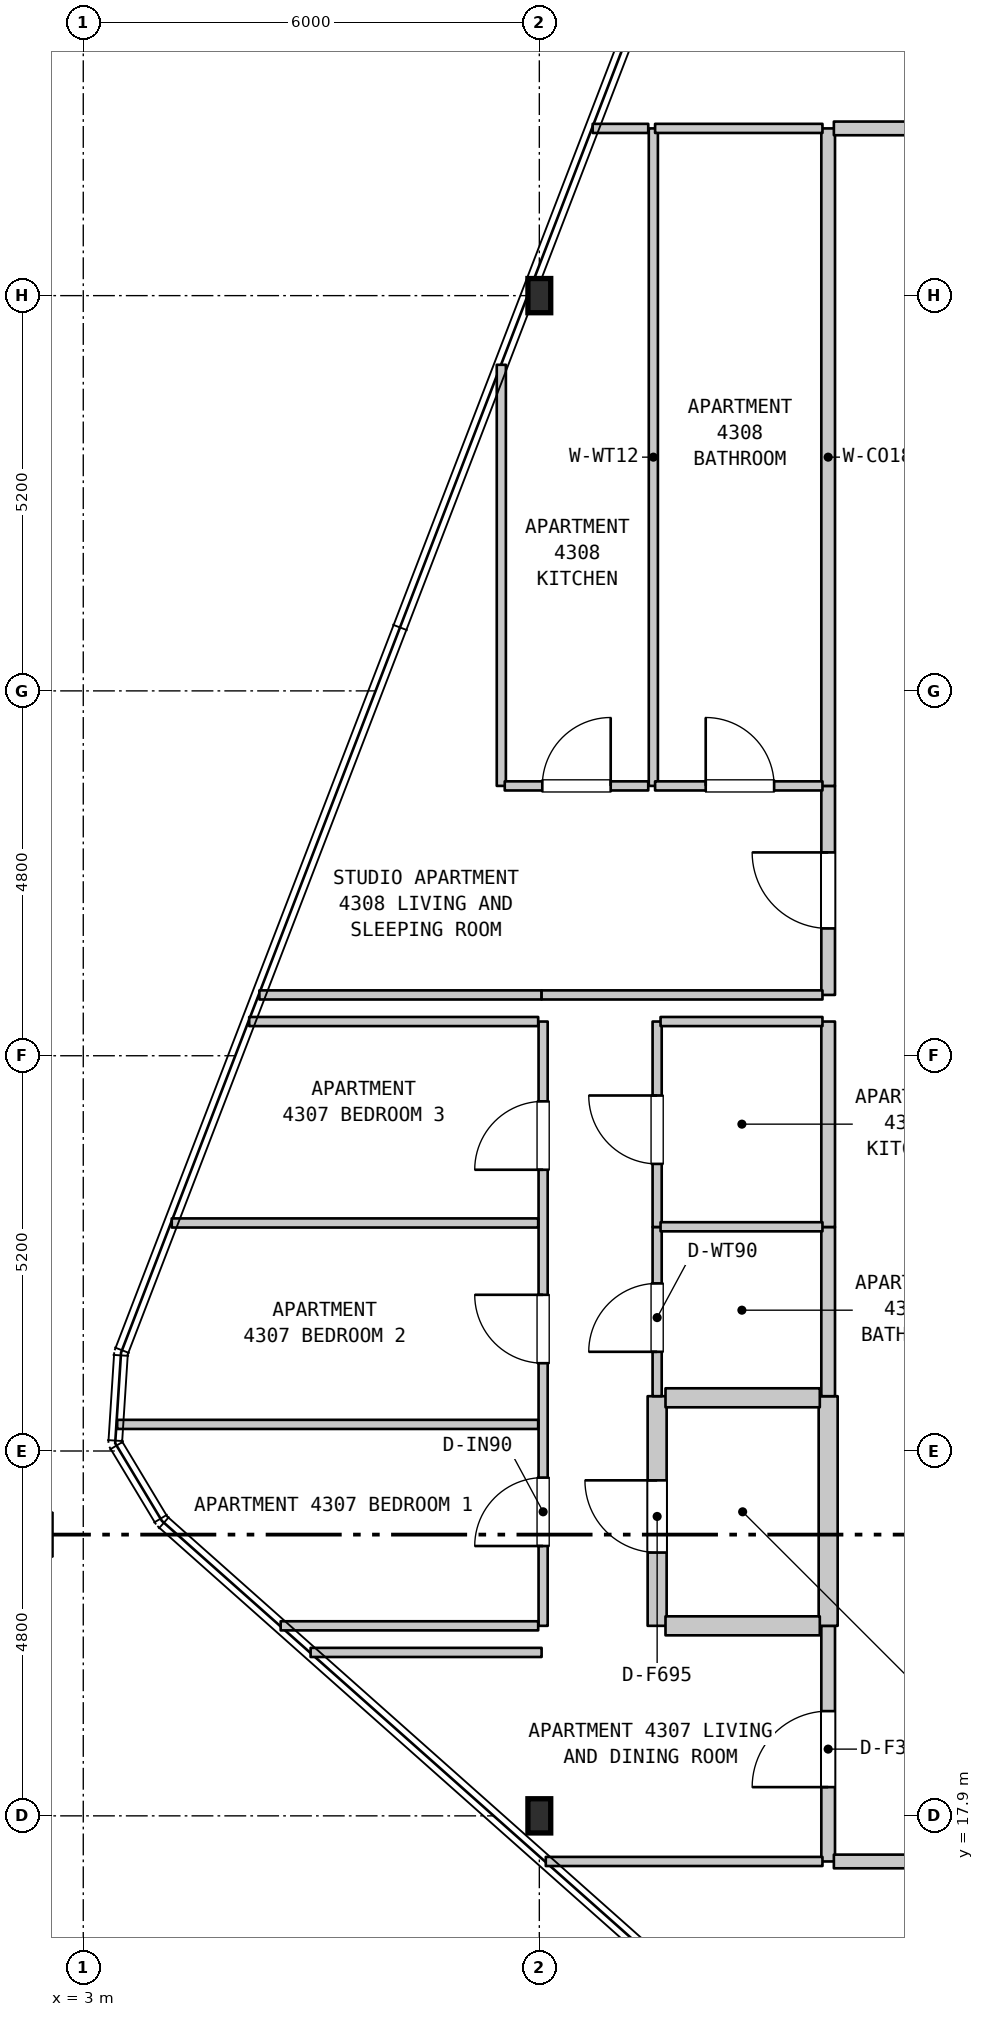
"""IFC4 building model, lengths in metres.
Left out: names, types, materials, properties, quantities, classifications, styles, units other than length and angle.
Written with IfcOpenShell. Run it as: python <this file> out.ifc"""

import sys

from ifc_helpers import new_model, si_unit, direction, frame, frame_2d, origin, origin_2d, place, context, subcontext, project, spatial, rectangle, i_section, extrude, element, fill, save


model = new_model("IFC4")
c1 = context("Model", 3, precision=1e-05, world=origin(), true_north=direction((0.0, 1.0)))
c2 = subcontext(c1, "Body", "Model", "MODEL_VIEW")
j1 = project(units=[si_unit("LENGTHUNIT", "METRE"), si_unit("PLANEANGLEUNIT", "RADIAN")], contexts=[c1])
p1 = place(None, origin())
s1 = spatial("IfcSite", under=j1, at=p1, CompositionType="ELEMENT")
p2 = place(p1, origin())
s2 = spatial("IfcBuilding", under=s1, at=p2, CompositionType="ELEMENT")
p3 = place(p2, frame((0.0, 0.0, 176.5)))
s3 = spatial("IfcBuildingStorey", under=s2, at=p3, CompositionType="ELEMENT", Elevation=176.5)
for number, where, z_axis, x_axis in (
    (1, (9.0, 17.9, 0.0), (0.0, 0.0, 1.0), (1.0, 0.0, 0.0)),
    (2, (9.0, 37.9, 0.0), (0.0, 0.0, 1.0), (1.0, 0.0, 0.0)),
):
    element("IfcColumn", number, at=place(p3, frame(where, z_axis=z_axis, x_axis=x_axis)), inside=s3, PredefinedType="COLUMN", context=c2, shape_type="SweptSolid", body=[
        extrude(i_section(OverallWidth=0.3, OverallDepth=0.45, WebThickness=0.014, FlangeThickness=0.026, FilletRadius=0.027, at=origin_2d()), origin(), (0.0, 0.0, 1.0), 3.7),
    ])
p4 = place(p3, frame((8.5, 31.45, 0.0), z_axis=(0.0, 0.0, 1.0), x_axis=(0.0, 1.0, 0.0)))
e3 = element("IfcWall", 3, at=p4, inside=s3, PredefinedType="PARTITIONING", context=c2, shape_type="SweptSolid", body=[
    extrude(rectangle(XDim=5.54, YDim=0.12, at=frame_2d((2.77, 0.0))), origin(), (0.0, 0.0, 1.0), 3.39),
])
p5 = place(p3, frame((9.05, 20.4, 0.0), z_axis=(0.0, 0.0, 1.0), x_axis=(0.0, 1.0, 0.0)))
e4 = element("IfcWall", 4, at=p5, inside=s3, PredefinedType="PARTITIONING", context=c2, shape_type="SweptSolid", body=[
    extrude(rectangle(XDim=7.95, YDim=0.12, at=frame_2d((3.975, 0.0))), origin(), (0.0, 0.0, 1.0), 2.79),
])
p6 = place(p5, frame((1.05, 0.0, 0.0)))
e5 = element("IfcOpeningElement", 5, at=p6, cuts=e4, PredefinedType="OPENING", context=c2, shape_type="SweptSolid", body=[
    extrude(rectangle(XDim=0.9, YDim=2.15, at=frame_2d((0.45, 1.075))), frame((0.0, 0.07, 0.0), z_axis=(0.0, -1.0, 0.0), x_axis=(1.0, 0.0, 0.0)), (0.0, 0.0, 1.0), 0.14),
])
p7 = place(p5, frame((3.455, 0.0, 0.0)))
e6 = element("IfcOpeningElement", 6, at=p7, cuts=e4, PredefinedType="OPENING", context=c2, shape_type="SweptSolid", body=[
    extrude(rectangle(XDim=0.9, YDim=2.15, at=frame_2d((0.45, 1.075))), frame((0.0, 0.07, 0.0), z_axis=(0.0, -1.0, 0.0), x_axis=(1.0, 0.0, 0.0)), (0.0, 0.0, 1.0), 0.14),
])
p8 = place(p5, frame((6.0, 0.0, 0.0)))
e7 = element("IfcOpeningElement", 7, at=p8, cuts=e4, PredefinedType="OPENING", context=c2, shape_type="SweptSolid", body=[
    extrude(rectangle(XDim=0.9, YDim=2.15, at=frame_2d((0.45, 1.075))), frame((0.0, 0.07, 0.0), z_axis=(0.0, -1.0, 0.0), x_axis=(1.0, 0.0, 0.0)), (0.0, 0.0, 1.0), 0.14),
])
p9 = place(p3, frame((10.5, 31.45, 0.0), z_axis=(0.0, 0.0, 1.0), x_axis=(0.0, 1.0, 0.0)))
e8 = element("IfcWall", 8, at=p9, inside=s3, PredefinedType="PARTITIONING", context=c2, shape_type="SweptSolid", body=[
    extrude(rectangle(XDim=8.65, YDim=0.12, at=frame_2d((4.325, 0.0))), origin(), (0.0, 0.0, 1.0), 3.39),
])
p10 = place(p3, frame((10.55, 20.4, 0.0), z_axis=(0.0, 0.0, 1.0), x_axis=(0.0, 1.0, 0.0)))
e9 = element("IfcWall", 9, at=p10, inside=s3, PredefinedType="STANDARD", context=c2, shape_type="SweptSolid", body=[
    extrude(rectangle(XDim=3.021, YDim=0.25, at=frame_2d((1.51, 0.0))), origin(), (0.0, 0.0, 1.0), 3.39),
])
p11 = place(p10, frame((0.964, 0.0, 0.0)))
e10 = element("IfcOpeningElement", 10, at=p11, cuts=e9, PredefinedType="OPENING", context=c2, shape_type="SweptSolid", body=[
    extrude(rectangle(XDim=0.95, YDim=2.15, at=frame_2d((0.475, 1.075))), frame((0.0, 0.135, 0.0), z_axis=(0.0, -1.0, 0.0), x_axis=(1.0, 0.0, 0.0)), (0.0, 0.0, 1.0), 0.27),
])
p12 = place(p3, frame((10.55, 23.421, 0.0), z_axis=(0.0, 0.0, 1.0), x_axis=(0.0, 1.0, 0.0)))
e11 = element("IfcWall", 11, at=p12, inside=s3, PredefinedType="PARTITIONING", context=c2, shape_type="SweptSolid", body=[
    extrude(rectangle(XDim=2.226, YDim=0.12, at=frame_2d((1.113, 0.0))), origin(), (0.0, 0.0, 1.0), 3.39),
])
p13 = place(p12, frame((0.584, 0.0, 0.0)))
e12 = element("IfcOpeningElement", 12, at=p13, cuts=e11, PredefinedType="OPENING", context=c2, shape_type="SweptSolid", body=[
    extrude(rectangle(XDim=0.9, YDim=2.1, at=frame_2d((0.45, 1.05))), frame((0.0, 0.07, 0.0), z_axis=(0.0, -1.0, 0.0), x_axis=(1.0, 0.0, 0.0)), (0.0, 0.0, 1.0), 0.14),
])
p14 = place(p3, frame((10.55, 25.647, 0.0), z_axis=(0.0, 0.0, 1.0), x_axis=(0.0, 1.0, 0.0)))
e13 = element("IfcWall", 13, at=p14, inside=s3, PredefinedType="PARTITIONING", context=c2, shape_type="SweptSolid", body=[
    extrude(rectangle(XDim=2.703, YDim=0.12, at=frame_2d((1.352, 0.0))), origin(), (0.0, 0.0, 1.0), 3.39),
])
p15 = place(p14, frame((0.83, 0.0, 0.0)))
e14 = element("IfcOpeningElement", 14, at=p15, cuts=e13, PredefinedType="OPENING", context=c2, shape_type="SweptSolid", body=[
    extrude(rectangle(XDim=0.9, YDim=2.15, at=frame_2d((0.45, 1.075))), frame((0.0, 0.07, 0.0), z_axis=(0.0, -1.0, 0.0), x_axis=(1.0, 0.0, 0.0)), (0.0, 0.0, 1.0), 0.14),
])
p16 = place(p3, frame((12.8, 17.3, 0.0), z_axis=(0.0, 0.0, 1.0), x_axis=(0.0, 1.0, 0.0)))
e15 = element("IfcWall", 15, at=p16, inside=s3, PredefinedType="STANDARD", context=c2, shape_type="SweptSolid", body=[
    extrude(rectangle(XDim=3.1, YDim=0.18, at=frame_2d((1.55, 0.0))), origin(), (0.0, 0.0, 1.0), 3.39),
])
p17 = place(p16, frame((0.978, 0.0, 0.0)))
e16 = element("IfcOpeningElement", 16, at=p17, cuts=e15, PredefinedType="OPENING", context=c2, shape_type="SweptSolid", body=[
    extrude(rectangle(XDim=1.0, YDim=2.15, at=frame_2d((0.5, 1.075))), frame((0.0, 0.1, 0.0), z_axis=(0.0, -1.0, 0.0), x_axis=(1.0, 0.0, 0.0)), (0.0, 0.0, 1.0), 0.2),
])
p18 = place(p3, frame((12.8, 20.4, 0.0), z_axis=(0.0, 0.0, 1.0), x_axis=(0.0, 1.0, 0.0)))
e17 = element("IfcWall", 17, at=p18, inside=s3, PredefinedType="STANDARD", context=c2, shape_type="SweptSolid", body=[
    extrude(rectangle(XDim=3.021, YDim=0.25, at=frame_2d((1.51, 0.0))), origin(), (0.0, 0.0, 1.0), 3.39),
])
p19 = place(p3, frame((12.8, 23.421, 0.0), z_axis=(0.0, 0.0, 1.0), x_axis=(0.0, 1.0, 0.0)))
e18 = element("IfcWall", 18, at=p19, inside=s3, PredefinedType="STANDARD", context=c2, shape_type="SweptSolid", body=[
    extrude(rectangle(XDim=2.226, YDim=0.18, at=frame_2d((1.113, 0.0))), origin(), (0.0, 0.0, 1.0), 3.39),
])
p20 = place(p3, frame((12.8, 25.647, 0.0), z_axis=(0.0, 0.0, 1.0), x_axis=(0.0, 1.0, 0.0)))
e19 = element("IfcWall", 19, at=p20, inside=s3, PredefinedType="STANDARD", context=c2, shape_type="SweptSolid", body=[
    extrude(rectangle(XDim=2.703, YDim=0.18, at=frame_2d((1.352, 0.0))), origin(), (0.0, 0.0, 1.0), 3.39),
])
p21 = place(p3, frame((12.8, 28.7, 0.0), z_axis=(0.0, 0.0, 1.0), x_axis=(0.0, 1.0, 0.0)))
e20 = element("IfcWall", 20, at=p21, inside=s3, PredefinedType="STANDARD", context=c2, shape_type="SweptSolid", body=[
    extrude(rectangle(XDim=2.75, YDim=0.18, at=frame_2d((1.375, 0.0))), origin(), (0.0, 0.0, 1.0), 3.39),
])
p22 = place(p21, frame((0.875, 0.0, 0.0)))
e21 = element("IfcOpeningElement", 21, at=p22, cuts=e20, PredefinedType="OPENING", context=c2, shape_type="SweptSolid", body=[
    extrude(rectangle(XDim=1.0, YDim=2.15, at=frame_2d((0.5, 1.075))), frame((0.0, 0.1, 0.0), z_axis=(0.0, -1.0, 0.0), x_axis=(1.0, 0.0, 0.0)), (0.0, 0.0, 1.0), 0.2),
])
p23 = place(p3, frame((12.8, 31.45, 0.0), z_axis=(0.0, 0.0, 1.0), x_axis=(0.0, 1.0, 0.0)))
e22 = element("IfcWall", 22, at=p23, inside=s3, PredefinedType="STANDARD", context=c2, shape_type="SweptSolid", body=[
    extrude(rectangle(XDim=8.65, YDim=0.18, at=frame_2d((4.325, 0.0))), origin(), (0.0, 0.0, 1.0), 3.39),
])
p24 = place(p3, frame((9.085, 17.3, 0.0), z_axis=(0.0, 0.0, 1.0), x_axis=(1.0, 0.0, 0.0)))
e23 = element("IfcWall", 23, at=p24, inside=s3, PredefinedType="PARTITIONING", context=c2, shape_type="SweptSolid", body=[
    extrude(rectangle(XDim=3.64, YDim=0.12, at=frame_2d((1.82, 0.0))), origin(), (0.0, 0.0, 1.0), 3.39),
])
p25 = place(p3, frame((12.875, 17.3, 0.0), z_axis=(0.0, 0.0, 1.0), x_axis=(1.0, 0.0, 0.0)))
e24 = element("IfcWall", 24, at=p25, inside=s3, PredefinedType="STANDARD", context=c2, shape_type="SweptSolid", body=[
    extrude(rectangle(XDim=7.35, YDim=0.18, at=frame_2d((3.675, 0.0))), origin(), (0.0, 0.0, 1.0), 3.39),
])
p26 = place(p25, frame((3.16, 0.0, 0.0)))
e25 = element("IfcOpeningElement", 25, at=p26, cuts=e24, PredefinedType="OPENING", context=c2, shape_type="SweptSolid", body=[
    extrude(rectangle(XDim=1.0, YDim=2.15, at=frame_2d((0.5, 1.075))), frame((0.0, 0.1, 0.0), z_axis=(0.0, -1.0, 0.0), x_axis=(1.0, 0.0, 0.0)), (0.0, 0.0, 1.0), 0.2),
])
p27 = place(p3, frame((5.991, 20.05, 0.0), z_axis=(0.0, 0.0, 1.0), x_axis=(1.0, 0.0, 0.0)))
e26 = element("IfcWall", 26, at=p27, inside=s3, PredefinedType="PARTITIONING", context=c2, shape_type="SweptSolid", body=[
    extrude(rectangle(XDim=3.039, YDim=0.12, at=frame_2d((1.52, 0.0))), origin(), (0.0, 0.0, 1.0), 3.39),
])
p28 = place(p3, frame((5.597, 20.4, 0.0), z_axis=(0.0, 0.0, 1.0), x_axis=(1.0, 0.0, 0.0)))
e27 = element("IfcWall", 27, at=p28, inside=s3, PredefinedType="PARTITIONING", context=c2, shape_type="SweptSolid", body=[
    extrude(rectangle(XDim=3.388, YDim=0.12, at=frame_2d((1.694, 0.0))), origin(), (0.0, 0.0, 1.0), 3.39),
])
p29 = place(p3, frame((10.66, 20.4, 0.0), z_axis=(0.0, 0.0, 1.0), x_axis=(1.0, 0.0, 0.0)))
e28 = element("IfcWall", 28, at=p29, inside=s3, PredefinedType="STANDARD", context=c2, shape_type="SweptSolid", body=[
    extrude(rectangle(XDim=2.03, YDim=0.25, at=frame_2d((1.015, 0.0))), origin(), (0.0, 0.0, 1.0), 3.39),
])
p30 = place(p3, frame((3.446, 23.05, 0.0), z_axis=(0.0, 0.0, 1.0), x_axis=(1.0, 0.0, 0.0)))
e29 = element("IfcWall", 29, at=p30, inside=s3, PredefinedType="PARTITIONING", context=c2, shape_type="SweptSolid", body=[
    extrude(rectangle(XDim=5.539, YDim=0.12, at=frame_2d((2.77, 0.0))), origin(), (0.0, 0.0, 1.0), 3.39),
])
p31 = place(p3, frame((10.66, 23.4, 0.0), z_axis=(0.0, 0.0, 1.0), x_axis=(1.0, 0.0, 0.0)))
e30 = element("IfcWall", 30, at=p31, inside=s3, PredefinedType="STANDARD", context=c2, shape_type="SweptSolid", body=[
    extrude(rectangle(XDim=2.03, YDim=0.25, at=frame_2d((1.015, 0.0))), origin(), (0.0, 0.0, 1.0), 3.39),
])
p32 = place(p3, frame((10.595, 25.65, 0.0), z_axis=(0.0, 0.0, 1.0), x_axis=(1.0, 0.0, 0.0)))
e31 = element("IfcWall", 31, at=p32, inside=s3, PredefinedType="PARTITIONING", context=c2, shape_type="SweptSolid", body=[
    extrude(rectangle(XDim=2.13, YDim=0.12, at=frame_2d((1.065, 0.0))), origin(), (0.0, 0.0, 1.0), 3.39),
])
p33 = place(p3, frame((4.164, 25.7, 0.0), z_axis=(0.0, 0.0, 1.0), x_axis=(1.0, 0.0, 0.0)))
e32 = element("IfcWall", 32, at=p33, inside=s3, PredefinedType="PARTITIONING", context=c2, shape_type="SweptSolid", body=[
    extrude(rectangle(XDim=4.821, YDim=0.12, at=frame_2d((2.411, 0.0))), origin(), (0.0, 0.0, 1.0), 3.39),
])
p34 = place(p3, frame((5.183, 28.35, 0.0), z_axis=(0.0, 0.0, 1.0), x_axis=(1.0, 0.0, 0.0)))
e33 = element("IfcWall", 33, at=p34, inside=s3, PredefinedType="PARTITIONING", context=c2, shape_type="SweptSolid", body=[
    extrude(rectangle(XDim=3.802, YDim=0.12, at=frame_2d((1.901, 0.0))), origin(), (0.0, 0.0, 1.0), 3.39),
])
p35 = place(p3, frame((10.595, 28.35, 0.0), z_axis=(0.0, 0.0, 1.0), x_axis=(1.0, 0.0, 0.0)))
e34 = element("IfcWall", 34, at=p35, inside=s3, PredefinedType="PARTITIONING", context=c2, shape_type="SweptSolid", body=[
    extrude(rectangle(XDim=2.13, YDim=0.12, at=frame_2d((1.065, 0.0))), origin(), (0.0, 0.0, 1.0), 3.39),
])
p36 = place(p3, frame((5.317, 28.7, 0.0), z_axis=(0.0, 0.0, 1.0), x_axis=(1.0, 0.0, 0.0)))
e35 = element("IfcWall", 35, at=p36, inside=s3, PredefinedType="PARTITIONING", context=c2, shape_type="SweptSolid", body=[
    extrude(rectangle(XDim=3.713, YDim=0.12, at=frame_2d((1.856, 0.0))), origin(), (0.0, 0.0, 1.0), 3.39),
])
p37 = place(p3, frame((9.03, 28.7, 0.0), z_axis=(0.0, 0.0, 1.0), x_axis=(1.0, 0.0, 0.0)))
e36 = element("IfcWall", 36, at=p37, inside=s3, PredefinedType="PARTITIONING", context=c2, shape_type="SweptSolid", body=[
    extrude(rectangle(XDim=3.695, YDim=0.12, at=frame_2d((1.848, 0.0))), origin(), (0.0, 0.0, 1.0), 3.39),
])
p38 = place(p3, frame((8.545, 31.45, 0.0), z_axis=(0.0, 0.0, 1.0), x_axis=(1.0, 0.0, 0.0)))
e37 = element("IfcWall", 37, at=p38, inside=s3, PredefinedType="PARTITIONING", context=c2, shape_type="SweptSolid", body=[
    extrude(rectangle(XDim=1.888, YDim=0.12, at=frame_2d((0.944, 0.0))), origin(), (0.0, 0.0, 1.0), 3.39),
])
p39 = place(p38, frame((0.494, 0.0, 0.0)))
e38 = element("IfcOpeningElement", 38, at=p39, cuts=e37, PredefinedType="OPENING", context=c2, shape_type="SweptSolid", body=[
    extrude(rectangle(XDim=0.9, YDim=2.15, at=frame_2d((0.45, 1.075))), frame((0.0, 0.07, 0.0), z_axis=(0.0, -1.0, 0.0), x_axis=(1.0, 0.0, 0.0)), (0.0, 0.0, 1.0), 0.14),
])
p40 = place(p3, frame((10.523, 31.45, 0.0), z_axis=(0.0, 0.0, 1.0), x_axis=(1.0, 0.0, 0.0)))
e39 = element("IfcWall", 39, at=p40, inside=s3, PredefinedType="PARTITIONING", context=c2, shape_type="SweptSolid", body=[
    extrude(rectangle(XDim=2.202, YDim=0.12, at=frame_2d((1.101, 0.0))), origin(), (0.0, 0.0, 1.0), 3.39),
])
p41 = place(p40, frame((0.666, 0.0, 0.0)))
e40 = element("IfcOpeningElement", 40, at=p41, cuts=e39, PredefinedType="OPENING", context=c2, shape_type="SweptSolid", body=[
    extrude(rectangle(XDim=0.9, YDim=2.1, at=frame_2d((0.45, 1.05))), frame((0.0, 0.07, 0.0), z_axis=(0.0, -1.0, 0.0), x_axis=(1.0, 0.0, 0.0)), (0.0, 0.0, 1.0), 0.14),
])
p42 = place(p3, frame((9.702, 40.1, 0.0), z_axis=(0.0, 0.0, 1.0), x_axis=(1.0, 0.0, 0.0)))
e41 = element("IfcWall", 41, at=p42, inside=s3, PredefinedType="PARTITIONING", context=c2, shape_type="SweptSolid", body=[
    extrude(rectangle(XDim=0.731, YDim=0.12, at=frame_2d((0.366, 0.0))), origin(), (0.0, 0.0, 1.0), 3.39),
])
p43 = place(p3, frame((10.523, 40.1, 0.0), z_axis=(0.0, 0.0, 1.0), x_axis=(1.0, 0.0, 0.0)))
e42 = element("IfcWall", 42, at=p43, inside=s3, PredefinedType="PARTITIONING", context=c2, shape_type="SweptSolid", body=[
    extrude(rectangle(XDim=2.202, YDim=0.12, at=frame_2d((1.101, 0.0))), origin(), (0.0, 0.0, 1.0), 3.39),
])
p44 = place(p3, frame((12.875, 40.1, 0.0), z_axis=(0.0, 0.0, 1.0), x_axis=(1.0, 0.0, 0.0)))
e43 = element("IfcWall", 43, at=p44, inside=s3, PredefinedType="STANDARD", context=c2, shape_type="SweptSolid", body=[
    extrude(rectangle(XDim=3.32, YDim=0.18, at=frame_2d((1.66, 0.0))), origin(), (0.0, 0.0, 1.0), 3.39),
])
p45 = place(p44, frame((1.071, 0.0, 0.0)))
e44 = element("IfcOpeningElement", 44, at=p45, cuts=e43, PredefinedType="OPENING", context=c2, shape_type="SweptSolid", body=[
    extrude(rectangle(XDim=1.0, YDim=2.15, at=frame_2d((0.5, 1.075))), frame((0.0, 0.1, 0.0), z_axis=(0.0, -1.0, 0.0), x_axis=(1.0, 0.0, 0.0)), (0.0, 0.0, 1.0), 0.2),
])
p46 = place(p6, origin())
e45 = element("IfcDoor", 45, at=p46, inside=s3, OperationType="SINGLE_SWING_LEFT", PredefinedType="DOOR", context=c2, shape_type="SweptSolid", body=[
    extrude(rectangle(XDim=0.9, YDim=2.15, at=frame_2d((0.45, 1.075))), frame((0.0, 0.025, 0.0), z_axis=(0.0, -1.0, 0.0), x_axis=(1.0, 0.0, 0.0)), (0.0, 0.0, 1.0), 0.05),
])
fill(e5, e45)
p47 = place(p7, origin())
e46 = element("IfcDoor", 46, at=p47, inside=s3, OperationType="SINGLE_SWING_RIGHT", PredefinedType="DOOR", context=c2, shape_type="SweptSolid", body=[
    extrude(rectangle(XDim=0.9, YDim=2.15, at=frame_2d((0.45, 1.075))), frame((0.0, 0.025, 0.0), z_axis=(0.0, -1.0, 0.0), x_axis=(1.0, 0.0, 0.0)), (0.0, 0.0, 1.0), 0.05),
])
fill(e6, e46)
p48 = place(p8, origin())
e47 = element("IfcDoor", 47, at=p48, inside=s3, OperationType="SINGLE_SWING_LEFT", PredefinedType="DOOR", context=c2, shape_type="SweptSolid", body=[
    extrude(rectangle(XDim=0.9, YDim=2.15, at=frame_2d((0.45, 1.075))), frame((0.0, 0.025, 0.0), z_axis=(0.0, -1.0, 0.0), x_axis=(1.0, 0.0, 0.0)), (0.0, 0.0, 1.0), 0.05),
])
fill(e7, e47)
p49 = place(p11, origin())
e48 = element("IfcDoor", 48, at=p49, inside=s3, OperationType="SINGLE_SWING_RIGHT", PredefinedType="DOOR", context=c2, shape_type="SweptSolid", body=[
    extrude(rectangle(XDim=0.95, YDim=2.15, at=frame_2d((0.475, 1.075))), frame((0.0, 0.025, 0.0), z_axis=(0.0, -1.0, 0.0), x_axis=(1.0, 0.0, 0.0)), (0.0, 0.0, 1.0), 0.05),
])
fill(e10, e48)
p50 = place(p13, origin())
e49 = element("IfcDoor", 49, at=p50, inside=s3, OperationType="SINGLE_SWING_LEFT", PredefinedType="DOOR", context=c2, shape_type="SweptSolid", body=[
    extrude(rectangle(XDim=0.9, YDim=2.1, at=frame_2d((0.45, 1.05))), frame((0.0, 0.025, 0.0), z_axis=(0.0, -1.0, 0.0), x_axis=(1.0, 0.0, 0.0)), (0.0, 0.0, 1.0), 0.05),
])
fill(e12, e49)
p51 = place(p15, origin())
e50 = element("IfcDoor", 50, at=p51, inside=s3, OperationType="SINGLE_SWING_RIGHT", PredefinedType="DOOR", context=c2, shape_type="SweptSolid", body=[
    extrude(rectangle(XDim=0.9, YDim=2.15, at=frame_2d((0.45, 1.075))), frame((0.0, 0.025, 0.0), z_axis=(0.0, -1.0, 0.0), x_axis=(1.0, 0.0, 0.0)), (0.0, 0.0, 1.0), 0.05),
])
fill(e14, e50)
p52 = place(p17, origin())
e51 = element("IfcDoor", 51, at=p52, inside=s3, OperationType="SINGLE_SWING_LEFT", PredefinedType="DOOR", context=c2, shape_type="SweptSolid", body=[
    extrude(rectangle(XDim=1.0, YDim=2.15, at=frame_2d((0.5, 1.075))), frame((0.0, 0.025, 0.0), z_axis=(0.0, -1.0, 0.0), x_axis=(1.0, 0.0, 0.0)), (0.0, 0.0, 1.0), 0.05),
])
fill(e16, e51)
p53 = place(p22, origin())
e52 = element("IfcDoor", 52, at=p53, inside=s3, OperationType="SINGLE_SWING_RIGHT", PredefinedType="DOOR", context=c2, shape_type="SweptSolid", body=[
    extrude(rectangle(XDim=1.0, YDim=2.15, at=frame_2d((0.5, 1.075))), frame((0.0, 0.025, 0.0), z_axis=(0.0, -1.0, 0.0), x_axis=(1.0, 0.0, 0.0)), (0.0, 0.0, 1.0), 0.05),
])
fill(e21, e52)
p54 = place(p39, origin())
e53 = element("IfcDoor", 53, at=p54, inside=s3, OperationType="SINGLE_SWING_RIGHT", PredefinedType="DOOR", context=c2, shape_type="SweptSolid", body=[
    extrude(rectangle(XDim=0.9, YDim=2.15, at=frame_2d((0.45, 1.075))), frame((0.0, 0.025, 0.0), z_axis=(0.0, -1.0, 0.0), x_axis=(1.0, 0.0, 0.0)), (0.0, 0.0, 1.0), 0.05),
])
fill(e38, e53)
p55 = place(p41, origin())
e54 = element("IfcDoor", 54, at=p55, inside=s3, OperationType="SINGLE_SWING_LEFT", PredefinedType="DOOR", context=c2, shape_type="SweptSolid", body=[
    extrude(rectangle(XDim=0.9, YDim=2.1, at=frame_2d((0.45, 1.05))), frame((0.0, 0.025, 0.0), z_axis=(0.0, -1.0, 0.0), x_axis=(1.0, 0.0, 0.0)), (0.0, 0.0, 1.0), 0.05),
])
fill(e40, e54)
save(model, sys.argv[1])
